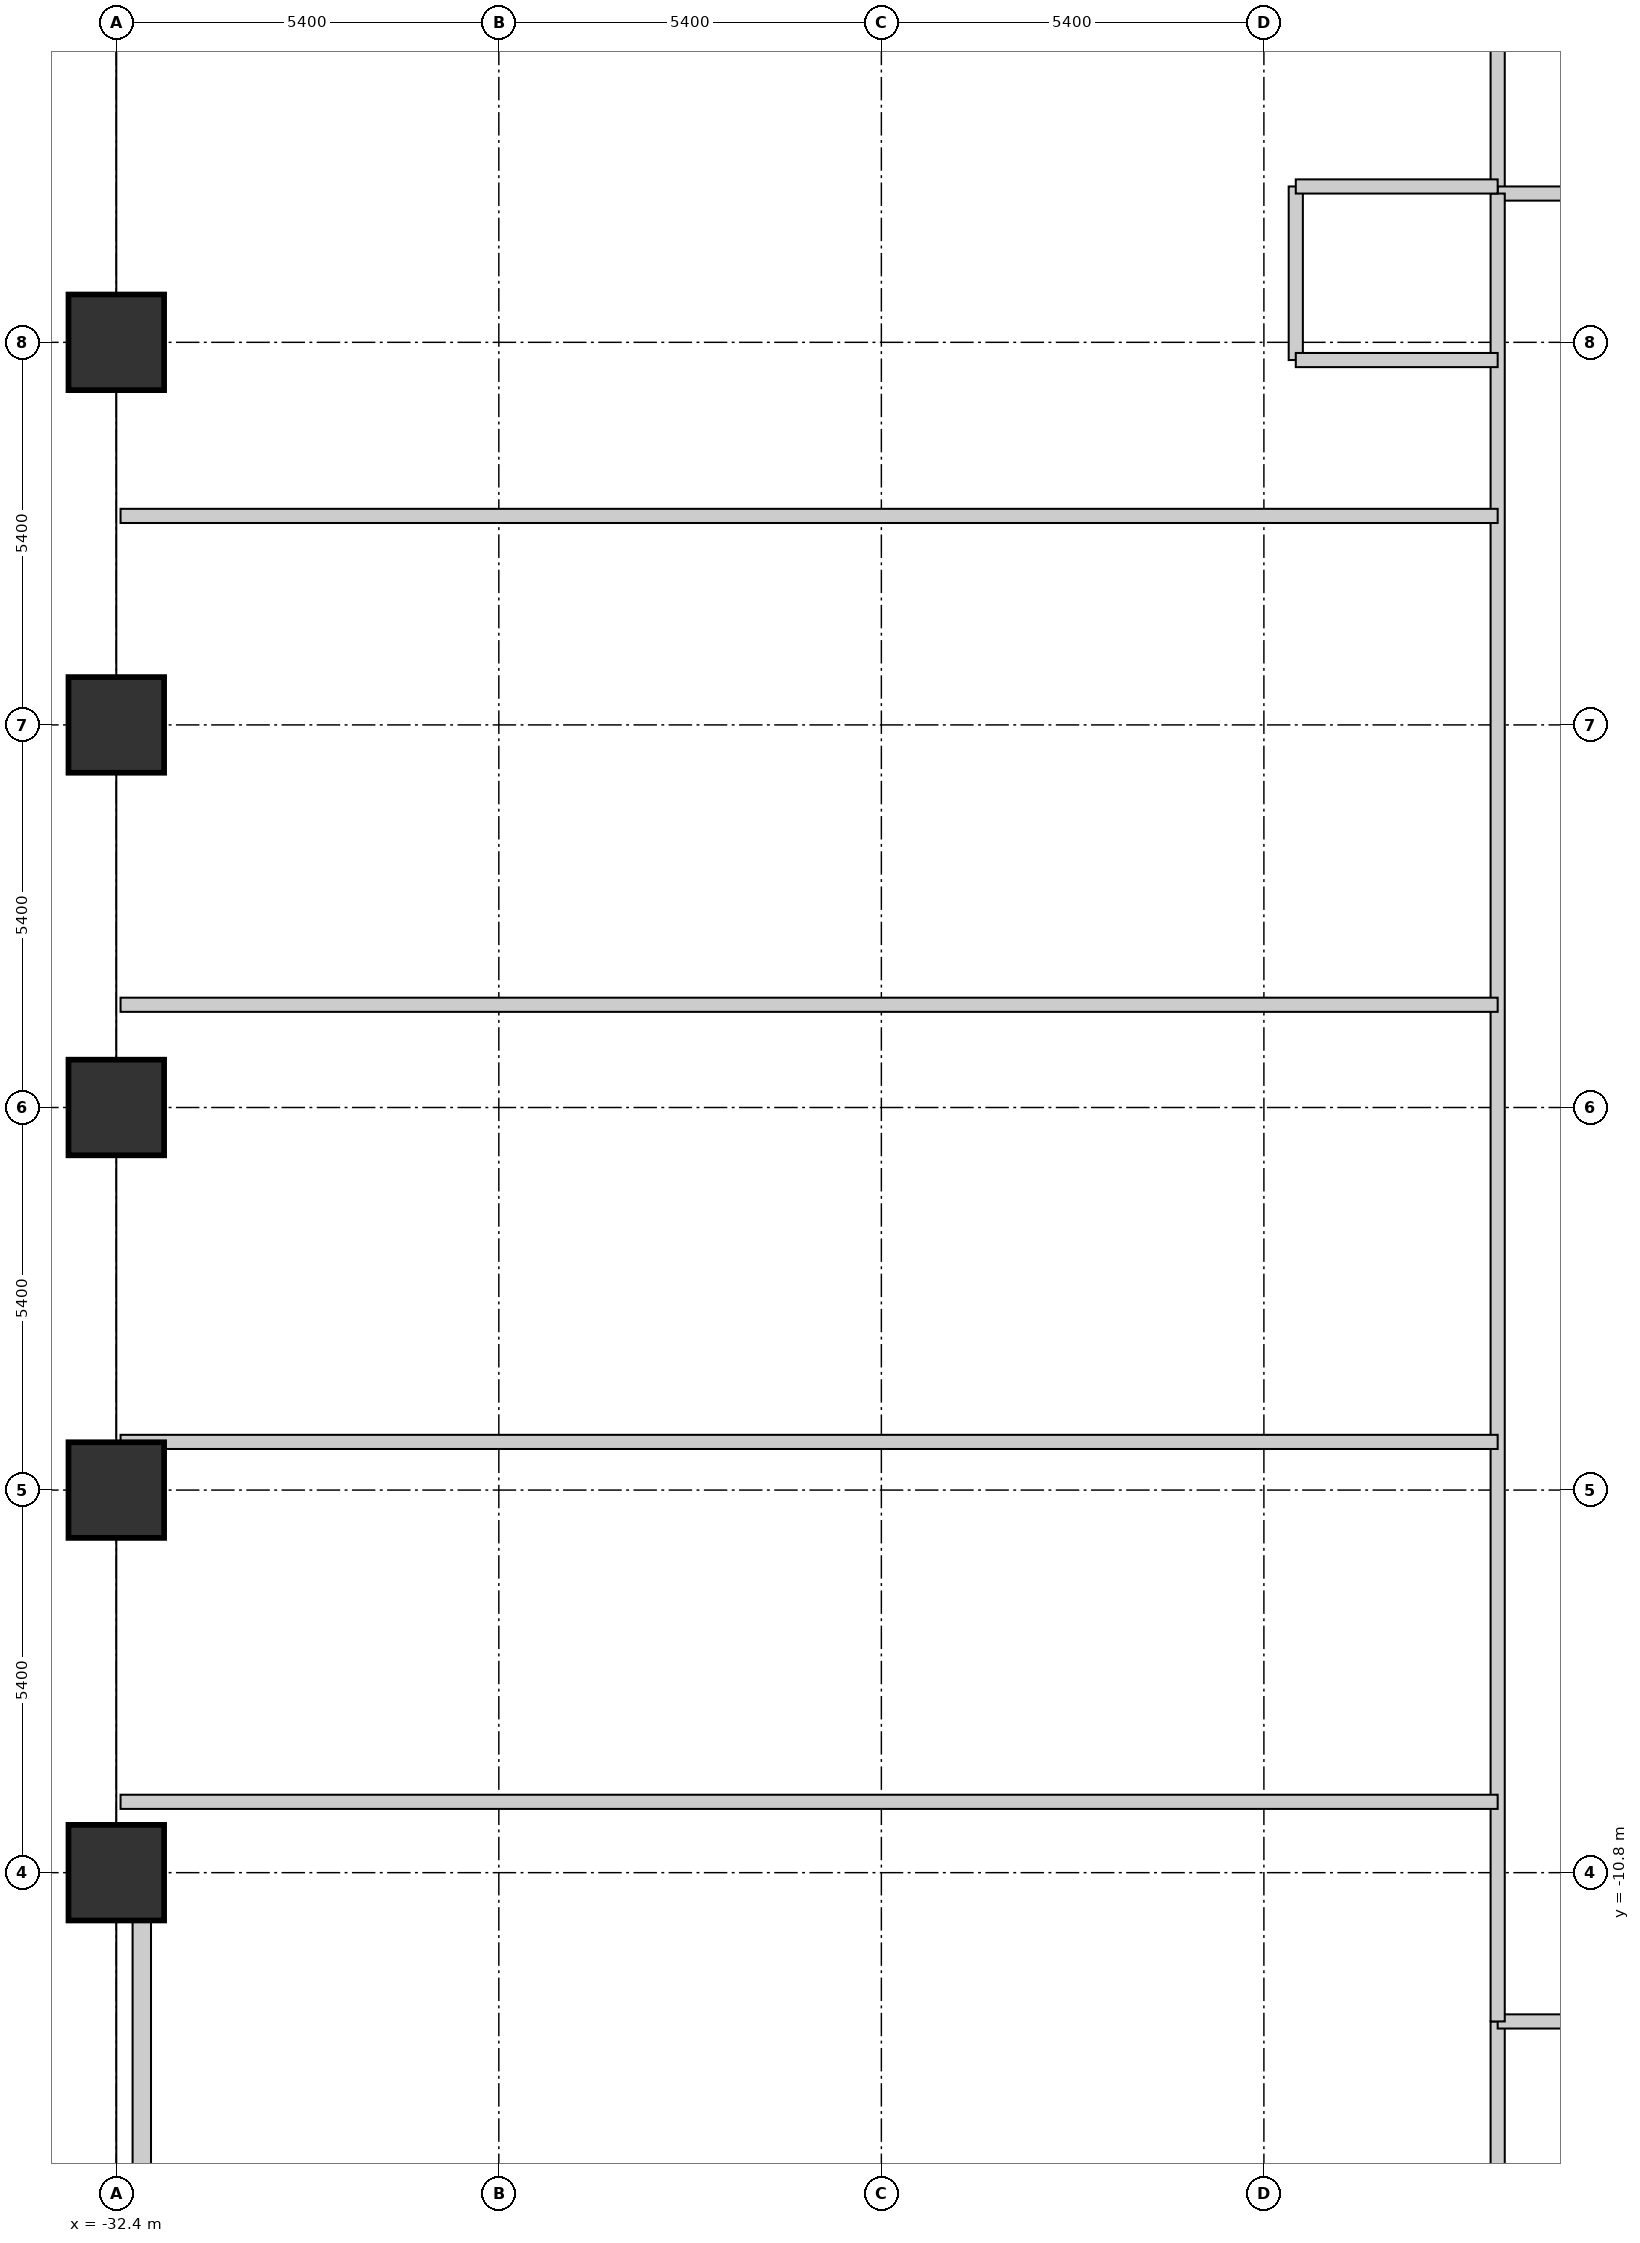
"""IFC4 building model, lengths in metres.
Left out: names, types, materials, properties, quantities, classifications, styles, units other than length and angle.
Written with IfcOpenShell. Run it as: python <this file> out.ifc"""

import sys

from ifc_helpers import new_model, si_unit, direction, frame, frame_2d, origin, origin_2d, place, context, subcontext, project, spatial, rectangle, extrude, element, fill, save


model = new_model("IFC4")
c1 = context("Model", 3, precision=1e-05, world=origin(), true_north=direction((0.0, 1.0)))
c2 = subcontext(c1, "Body", "Model", "MODEL_VIEW")
j1 = project(units=[si_unit("LENGTHUNIT", "METRE"), si_unit("PLANEANGLEUNIT", "RADIAN")], contexts=[c1])
p1 = place(None, origin())
s1 = spatial("IfcSite", under=j1, at=p1, CompositionType="ELEMENT")
p2 = place(p1, origin())
s2 = spatial("IfcBuilding", under=s1, at=p2, CompositionType="ELEMENT")
p3 = place(p2, frame((0.0, 0.0, 22.5)))
s3 = spatial("IfcBuildingStorey", under=s2, at=p3, CompositionType="ELEMENT", Elevation=22.5)
for number, where, z_axis, x_axis in (
    (1, (-32.4, -10.8, 0.0), (0.0, 0.0, 1.0), (1.0, 0.0, 0.0)),
    (2, (-32.4, -5.4, 0.0), (0.0, 0.0, 1.0), (1.0, 0.0, 0.0)),
    (3, (-32.4, 0.0, 0.0), (0.0, 0.0, 1.0), (1.0, 0.0, 0.0)),
    (4, (-32.4, 5.4, 0.0), (0.0, 0.0, 1.0), (1.0, 0.0, 0.0)),
    (5, (-32.4, 10.8, 0.0), (0.0, 0.0, 1.0), (1.0, 0.0, 0.0)),
):
    element("IfcColumn", number, at=place(p3, frame(where, z_axis=z_axis, x_axis=x_axis)), inside=s3, PredefinedType="COLUMN", context=c2, shape_type="SweptSolid", body=[
        extrude(rectangle(XDim=1.35, YDim=1.35, at=origin_2d()), origin(), (0.0, 0.0, 1.0), 3.75),
    ])
p4 = place(p3, frame((-32.04, -11.473, 0.0), z_axis=(0.0, 0.0, 1.0), x_axis=(0.0, -1.0, 0.0)))
e6 = element("IfcWall", 6, at=p4, inside=s3, PredefinedType="STANDARD", context=c2, shape_type="SweptSolid", body=[
    extrude(rectangle(XDim=4.054, YDim=0.26, at=frame_2d((2.027, 0.0))), origin(), (0.0, 0.0, 1.0), 2.629),
])
for number, where, z_axis, x_axis in (
    (7, (-12.9, 12.9, 0.0), (0.0, 0.0, 1.0), (0.0, 1.0, 0.0)),
    (8, (-12.9, -25.84, 0.0), (0.0, 0.0, 1.0), (0.0, 1.0, 0.0)),
):
    element("IfcWall", number, at=place(p3, frame(where, z_axis=z_axis, x_axis=x_axis)), inside=s3, PredefinedType="PARTITIONING", context=c2, shape_type="SweptSolid", body=[
        extrude(rectangle(XDim=12.94, YDim=0.2, at=frame_2d((6.47, 0.0))), origin(), (0.0, 0.0, 1.0), 2.629),
    ])
p5 = place(p3, frame((-12.9, 12.9, 0.0), z_axis=(0.0, 0.0, 1.0), x_axis=(1.0, 0.0, 0.0)))
e9 = element("IfcWall", 9, at=p5, inside=s3, PredefinedType="PARTITIONING", context=c2, shape_type="SweptSolid", body=[
    extrude(rectangle(XDim=25.8, YDim=0.2, at=frame_2d((12.9, 0.0))), origin(), (0.0, 0.0, 1.0), 2.93),
])
p6 = place(p5, frame((4.347, 0.0, 0.0)))
e10 = element("IfcOpeningElement", 10, at=p6, cuts=e9, PredefinedType="OPENING", context=c2, shape_type="SweptSolid", body=[
    extrude(rectangle(XDim=0.85, YDim=2.1, at=frame_2d((0.425, 1.05))), frame((0.0, 0.11, 0.0), z_axis=(0.0, -1.0, 0.0), x_axis=(1.0, 0.0, 0.0)), (0.0, 0.0, 1.0), 0.22),
])
p7 = place(p5, frame((9.1, 0.0, 0.0)))
e11 = element("IfcOpeningElement", 11, at=p7, cuts=e9, PredefinedType="OPENING", context=c2, shape_type="SweptSolid", body=[
    extrude(rectangle(XDim=0.85, YDim=2.1, at=frame_2d((0.425, 1.05))), frame((0.0, 0.11, 0.0), z_axis=(0.0, -1.0, 0.0), x_axis=(1.0, 0.0, 0.0)), (0.0, 0.0, 1.0), 0.22),
])
p8 = place(p5, frame((19.16, 0.0, 0.0)))
e12 = element("IfcOpeningElement", 12, at=p8, cuts=e9, PredefinedType="OPENING", context=c2, shape_type="SweptSolid", body=[
    extrude(rectangle(XDim=0.95, YDim=2.1, at=frame_2d((0.475, 1.05))), frame((0.0, 0.11, 0.0), z_axis=(0.0, -1.0, 0.0), x_axis=(1.0, 0.0, 0.0)), (0.0, 0.0, 1.0), 0.22),
])
p9 = place(p3, frame((-12.9, -12.9, 0.0), z_axis=(0.0, 0.0, 1.0), x_axis=(1.0, 0.0, 0.0)))
e13 = element("IfcWall", 13, at=p9, inside=s3, PredefinedType="PARTITIONING", context=c2, shape_type="SweptSolid", body=[
    extrude(rectangle(XDim=24.0, YDim=0.2, at=frame_2d((12.0, 0.0))), origin(), (0.0, 0.0, 1.0), 2.93),
])
p10 = place(p9, frame((3.63, 0.0, 0.0)))
e14 = element("IfcOpeningElement", 14, at=p10, cuts=e13, PredefinedType="OPENING", context=c2, shape_type="SweptSolid", body=[
    extrude(rectangle(XDim=0.85, YDim=2.1, at=frame_2d((0.425, 1.05))), frame((0.0, 0.11, 0.0), z_axis=(0.0, -1.0, 0.0), x_axis=(1.0, 0.0, 0.0)), (0.0, 0.0, 1.0), 0.22),
])
p11 = place(p9, frame((15.19, 0.0, 0.0)))
e15 = element("IfcOpeningElement", 15, at=p11, cuts=e13, PredefinedType="OPENING", context=c2, shape_type="SweptSolid", body=[
    extrude(rectangle(XDim=0.85, YDim=2.1, at=frame_2d((0.425, 1.05))), frame((0.0, 0.11, 0.0), z_axis=(0.0, -1.0, 0.0), x_axis=(1.0, 0.0, 0.0)), (0.0, 0.0, 1.0), 0.22),
])
p12 = place(p9, frame((19.71, 0.0, 0.0)))
e16 = element("IfcOpeningElement", 16, at=p12, cuts=e13, PredefinedType="OPENING", context=c2, shape_type="SweptSolid", body=[
    extrude(rectangle(XDim=0.85, YDim=2.1, at=frame_2d((0.425, 1.05))), frame((0.0, 0.11, 0.0), z_axis=(0.0, -1.0, 0.0), x_axis=(1.0, 0.0, 0.0)), (0.0, 0.0, 1.0), 0.22),
])
p13 = place(p3, frame((-12.9, -12.9, 0.0), z_axis=(0.0, 0.0, 1.0), x_axis=(0.0, 1.0, 0.0)))
e17 = element("IfcWall", 17, at=p13, inside=s3, PredefinedType="PARTITIONING", context=c2, shape_type="SweptSolid", body=[
    extrude(rectangle(XDim=25.8, YDim=0.2, at=frame_2d((12.9, 0.0))), origin(), (0.0, 0.0, 1.0), 3.57),
])
p14 = place(p13, frame((0.28, 0.0, 0.0)))
e18 = element("IfcOpeningElement", 18, at=p14, cuts=e17, PredefinedType="OPENING", context=c2, shape_type="SweptSolid", body=[
    extrude(rectangle(XDim=0.95, YDim=2.1, at=frame_2d((0.475, 1.05))), frame((0.0, 0.11, 0.0), z_axis=(0.0, -1.0, 0.0), x_axis=(1.0, 0.0, 0.0)), (0.0, 0.0, 1.0), 0.22),
])
p15 = place(p13, frame((24.205, 0.0, 0.0)))
e19 = element("IfcOpeningElement", 19, at=p15, cuts=e17, PredefinedType="OPENING", context=c2, shape_type="SweptSolid", body=[
    extrude(rectangle(XDim=0.85, YDim=2.1, at=frame_2d((0.425, 1.05))), frame((0.0, 0.11, 0.0), z_axis=(0.0, -1.0, 0.0), x_axis=(1.0, 0.0, 0.0)), (0.0, 0.0, 1.0), 0.22),
])
p16 = place(p13, frame((21.87, 0.0, 0.0)))
e20 = element("IfcOpeningElement", 20, at=p16, cuts=e17, PredefinedType="OPENING", context=c2, shape_type="SweptSolid", body=[
    extrude(rectangle(XDim=0.95, YDim=2.1, at=frame_2d((0.475, 1.05))), frame((0.0, 0.11, 0.0), z_axis=(0.0, -1.0, 0.0), x_axis=(1.0, 0.0, 0.0)), (0.0, 0.0, 1.0), 0.22),
])
p17 = place(p13, frame((5.16, 0.0, 0.0)))
e21 = element("IfcOpeningElement", 21, at=p17, cuts=e17, PredefinedType="OPENING", context=c2, shape_type="SweptSolid", body=[
    extrude(rectangle(XDim=0.95, YDim=2.1, at=frame_2d((0.475, 1.05))), frame((0.0, 0.11, 0.0), z_axis=(0.0, -1.0, 0.0), x_axis=(1.0, 0.0, 0.0)), (0.0, 0.0, 1.0), 0.22),
])
p18 = place(p13, frame((10.785, 0.0, 0.0)))
e22 = element("IfcOpeningElement", 22, at=p18, cuts=e17, PredefinedType="OPENING", context=c2, shape_type="SweptSolid", body=[
    extrude(rectangle(XDim=0.95, YDim=2.1, at=frame_2d((0.475, 1.05))), frame((0.0, 0.11, 0.0), z_axis=(0.0, -1.0, 0.0), x_axis=(1.0, 0.0, 0.0)), (0.0, 0.0, 1.0), 0.22),
])
p19 = place(p13, frame((15.045, 0.0, 0.0)))
e23 = element("IfcOpeningElement", 23, at=p19, cuts=e17, PredefinedType="OPENING", context=c2, shape_type="SweptSolid", body=[
    extrude(rectangle(XDim=0.95, YDim=2.1, at=frame_2d((0.475, 1.05))), frame((0.0, 0.11, 0.0), z_axis=(0.0, -1.0, 0.0), x_axis=(1.0, 0.0, 0.0)), (0.0, 0.0, 1.0), 0.22),
])
for number, where, z_axis, x_axis in (
    (24, (-32.34, -4.72, 0.0), (0.0, 0.0, 1.0), (1.0, 0.0, 0.0)),
    (25, (-32.34, 1.45, 0.0), (0.0, 0.0, 1.0), (1.0, 0.0, 0.0)),
):
    element("IfcWall", number, at=place(p3, frame(where, z_axis=z_axis, x_axis=x_axis)), inside=s3, PredefinedType="PARTITIONING", context=c2, shape_type="SweptSolid", body=[
        extrude(rectangle(XDim=19.44, YDim=0.2, at=frame_2d((9.72, 0.0))), origin(), (0.0, 0.0, 1.0), 2.629),
    ])
p20 = place(p3, frame((-15.75, 10.55, 0.0), z_axis=(0.0, 0.0, 1.0), x_axis=(0.0, 1.0, 0.0)))
e26 = element("IfcWall", 26, at=p20, inside=s3, PredefinedType="PARTITIONING", context=c2, shape_type="SweptSolid", body=[
    extrude(rectangle(XDim=2.45, YDim=0.2, at=frame_2d((1.225, 0.0))), origin(), (0.0, 0.0, 1.0), 3.57),
])
for number, where, z_axis, x_axis in (
    (27, (-15.75, 13.0, 0.0), (0.0, 0.0, 1.0), (1.0, 0.0, 0.0)),
    (28, (-15.75, 10.55, 0.0), (0.0, 0.0, 1.0), (1.0, 0.0, 0.0)),
):
    element("IfcWall", number, at=place(p3, frame(where, z_axis=z_axis, x_axis=x_axis)), inside=s3, PredefinedType="PARTITIONING", context=c2, shape_type="SweptSolid", body=[
        extrude(rectangle(XDim=2.85, YDim=0.2, at=frame_2d((1.425, 0.0))), origin(), (0.0, 0.0, 1.0), 3.57),
    ])
for number, where, z_axis, x_axis in (
    (29, (-32.34, -9.8, 0.0), (0.0, 0.0, 1.0), (1.0, 0.0, 0.0)),
    (30, (-32.34, 8.35, 0.0), (0.0, 0.0, 1.0), (1.0, 0.0, 0.0)),
):
    element("IfcWall", number, at=place(p3, frame(where, z_axis=z_axis, x_axis=x_axis)), inside=s3, PredefinedType="PARTITIONING", context=c2, shape_type="SweptSolid", body=[
        extrude(rectangle(XDim=19.44, YDim=0.2, at=frame_2d((9.72, 0.0))), origin(), (0.0, 0.0, 1.0), 2.629),
    ])
p21 = place(p14, origin())
e31 = element("IfcDoor", 31, at=p21, inside=s3, OperationType="SINGLE_SWING_RIGHT", PredefinedType="DOOR", context=c2, shape_type="SweptSolid", body=[
    extrude(rectangle(XDim=0.95, YDim=2.1, at=frame_2d((0.475, 1.05))), frame((0.0, 0.025, 0.0), z_axis=(0.0, -1.0, 0.0), x_axis=(1.0, 0.0, 0.0)), (0.0, 0.0, 1.0), 0.05),
])
fill(e18, e31)
p22 = place(p15, origin())
e32 = element("IfcDoor", 32, at=p22, inside=s3, OperationType="SINGLE_SWING_LEFT", PredefinedType="DOOR", context=c2, shape_type="SweptSolid", body=[
    extrude(rectangle(XDim=0.85, YDim=2.1, at=frame_2d((0.425, 1.05))), frame((0.0, 0.025, 0.0), z_axis=(0.0, -1.0, 0.0), x_axis=(1.0, 0.0, 0.0)), (0.0, 0.0, 1.0), 0.05),
])
fill(e19, e32)
p23 = place(p16, origin())
e33 = element("IfcDoor", 33, at=p23, inside=s3, OperationType="SINGLE_SWING_RIGHT", PredefinedType="DOOR", context=c2, shape_type="SweptSolid", body=[
    extrude(rectangle(XDim=0.95, YDim=2.1, at=frame_2d((0.475, 1.05))), frame((0.0, 0.025, 0.0), z_axis=(0.0, -1.0, 0.0), x_axis=(1.0, 0.0, 0.0)), (0.0, 0.0, 1.0), 0.05),
])
fill(e20, e33)
p24 = place(p17, origin())
e34 = element("IfcDoor", 34, at=p24, inside=s3, OperationType="SINGLE_SWING_LEFT", PredefinedType="DOOR", context=c2, shape_type="SweptSolid", body=[
    extrude(rectangle(XDim=0.95, YDim=2.1, at=frame_2d((0.475, 1.05))), frame((0.0, 0.025, 0.0), z_axis=(0.0, -1.0, 0.0), x_axis=(1.0, 0.0, 0.0)), (0.0, 0.0, 1.0), 0.05),
])
fill(e21, e34)
p25 = place(p18, origin())
e35 = element("IfcDoor", 35, at=p25, inside=s3, OperationType="SINGLE_SWING_RIGHT", PredefinedType="DOOR", context=c2, shape_type="SweptSolid", body=[
    extrude(rectangle(XDim=0.95, YDim=2.1, at=frame_2d((0.475, 1.05))), frame((0.0, 0.025, 0.0), z_axis=(0.0, -1.0, 0.0), x_axis=(1.0, 0.0, 0.0)), (0.0, 0.0, 1.0), 0.05),
])
fill(e22, e35)
p26 = place(p19, origin())
e36 = element("IfcDoor", 36, at=p26, inside=s3, OperationType="SINGLE_SWING_LEFT", PredefinedType="DOOR", context=c2, shape_type="SweptSolid", body=[
    extrude(rectangle(XDim=0.95, YDim=2.1, at=frame_2d((0.475, 1.05))), frame((0.0, 0.025, 0.0), z_axis=(0.0, -1.0, 0.0), x_axis=(1.0, 0.0, 0.0)), (0.0, 0.0, 1.0), 0.05),
])
fill(e23, e36)
save(model, sys.argv[1])
